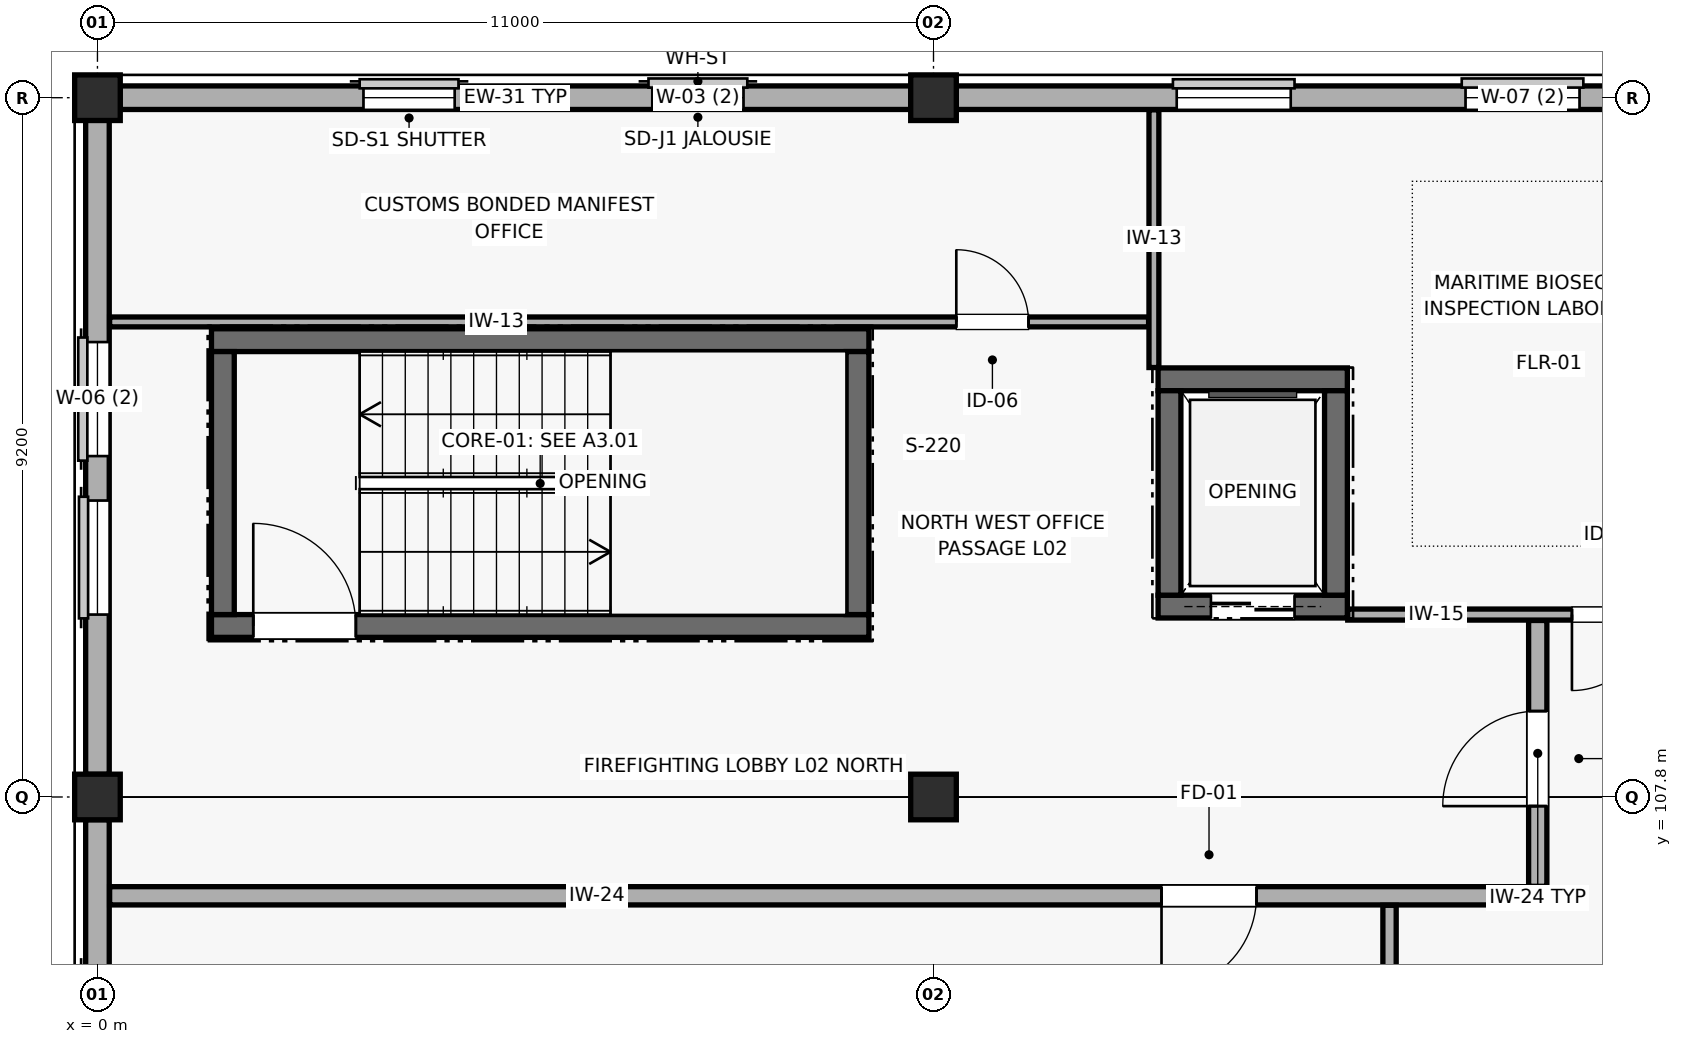
"""IFC4 building model, lengths in metres.
Left out: names, types, materials, properties, quantities, classifications, styles, units other than length and angle.
Written with IfcOpenShell. Run it as: python <this file> out.ifc"""

import sys

from ifc_helpers import new_model, si_unit, direction, frame, frame_2d, origin, origin_2d, place, context, subcontext, project, spatial, rectangle, extrude, element, fill, save


model = new_model("IFC4")
c1 = context("Model", 3, precision=1e-05, world=origin(), true_north=direction((0.0, 1.0)))
c2 = subcontext(c1, "Body", "Model", "MODEL_VIEW")
j1 = project(units=[si_unit("LENGTHUNIT", "METRE"), si_unit("PLANEANGLEUNIT", "RADIAN")], contexts=[c1])
p1 = place(None, origin())
s1 = spatial("IfcSite", under=j1, at=p1, CompositionType="ELEMENT")
p2 = place(p1, origin())
s2 = spatial("IfcBuilding", under=s1, at=p2, CompositionType="ELEMENT")
p3 = place(p2, frame((0.0, 0.0, 9.9)))
s3 = spatial("IfcBuildingStorey", under=s2, at=p3, CompositionType="ELEMENT", Elevation=9.9)
for number, where, z_axis, x_axis in (
    (1, (0.0, 107.8, 0.0), (0.0, 0.0, 1.0), (1.0, 0.0, 0.0)),
    (2, (0.0, 117.0, 0.0), (0.0, 0.0, 1.0), (1.0, 0.0, 0.0)),
    (3, (11.0, 107.8, 0.0), (0.0, 0.0, 1.0), (1.0, 0.0, 0.0)),
    (4, (11.0, 117.0, 0.0), (0.0, 0.0, 1.0), (1.0, 0.0, 0.0)),
):
    element("IfcColumn", number, at=place(p3, frame(where, z_axis=z_axis, x_axis=x_axis)), inside=s3, PredefinedType="COLUMN", context=c2, shape_type="SweptSolid", body=[
        extrude(rectangle(XDim=0.6, YDim=0.6, at=origin_2d()), origin(), (0.0, 0.0, 1.0), 4.2),
    ])
p4 = place(p3, frame((10.702, 117.0, 0.0), z_axis=(0.0, 0.0, 1.0), x_axis=(-1.0, 0.0, 0.0)))
e5 = element("IfcWall", 5, at=p4, inside=s3, PredefinedType="SOLIDWALL", context=c2, shape_type="SweptSolid", body=[
    extrude(rectangle(XDim=10.404, YDim=0.31, at=frame_2d((5.202, 0.0))), origin(), (0.0, 0.0, 1.0), 3.425),
])
p5 = place(p4, frame((2.202, 0.0, 0.95)))
e6 = element("IfcOpeningElement", 6, at=p5, cuts=e5, PredefinedType="OPENING", context=c2, shape_type="SweptSolid", body=[
    extrude(rectangle(XDim=1.2, YDim=1.8, at=frame_2d((0.6, 0.9))), frame((0.0, 0.165, 0.0), z_axis=(0.0, -1.0, 0.0), x_axis=(1.0, 0.0, 0.0)), (0.0, 0.0, 1.0), 0.33),
])
p6 = place(p4, frame((6.002, 0.0, 0.95)))
e7 = element("IfcOpeningElement", 7, at=p6, cuts=e5, PredefinedType="OPENING", context=c2, shape_type="SweptSolid", body=[
    extrude(rectangle(XDim=1.2, YDim=1.8, at=frame_2d((0.6, 0.9))), frame((0.0, 0.165, 0.0), z_axis=(0.0, -1.0, 0.0), x_axis=(1.0, 0.0, 0.0)), (0.0, 0.0, 1.0), 0.33),
])
p7 = place(p3, frame((21.702, 117.0, 0.0), z_axis=(0.0, 0.0, 1.0), x_axis=(-1.0, 0.0, 0.0)))
e8 = element("IfcWall", 8, at=p7, inside=s3, PredefinedType="SOLIDWALL", context=c2, shape_type="SweptSolid", body=[
    extrude(rectangle(XDim=10.404, YDim=0.31, at=frame_2d((5.202, 0.0))), origin(), (0.0, 0.0, 1.0), 3.425),
])
p8 = place(p7, frame((2.202, 0.0, 0.95)))
e9 = element("IfcOpeningElement", 9, at=p8, cuts=e8, PredefinedType="OPENING", context=c2, shape_type="SweptSolid", body=[
    extrude(rectangle(XDim=1.5, YDim=2.25, at=frame_2d((0.75, 1.125))), frame((0.0, 0.165, 0.0), z_axis=(0.0, -1.0, 0.0), x_axis=(1.0, 0.0, 0.0)), (0.0, 0.0, 1.0), 0.33),
])
p9 = place(p7, frame((6.002, 0.0, 0.95)))
e10 = element("IfcOpeningElement", 10, at=p9, cuts=e8, PredefinedType="OPENING", context=c2, shape_type="SweptSolid", body=[
    extrude(rectangle(XDim=1.5, YDim=2.25, at=frame_2d((0.75, 1.125))), frame((0.0, 0.165, 0.0), z_axis=(0.0, -1.0, 0.0), x_axis=(1.0, 0.0, 0.0)), (0.0, 0.0, 1.0), 0.33),
])
p10 = place(p3, frame((0.0, 107.502, 0.0), z_axis=(0.0, 0.0, 1.0), x_axis=(0.0, -1.0, 0.0)))
e11 = element("IfcWall", 11, at=p10, inside=s3, PredefinedType="SOLIDWALL", context=c2, shape_type="SweptSolid", body=[
    extrude(rectangle(XDim=8.604, YDim=0.31, at=frame_2d((4.302, 0.0))), origin(), (0.0, 0.0, 1.0), 3.525),
])
p11 = place(p10, frame((2.002, 0.0, 0.95)))
e12 = element("IfcOpeningElement", 12, at=p11, cuts=e11, PredefinedType="OPENING", context=c2, shape_type="SweptSolid", body=[
    extrude(rectangle(XDim=1.5, YDim=1.8, at=frame_2d((0.75, 0.9))), frame((0.0, 0.165, 0.0), z_axis=(0.0, -1.0, 0.0), x_axis=(1.0, 0.0, 0.0)), (0.0, 0.0, 1.0), 0.33),
])
p12 = place(p10, frame((5.002, 0.0, 0.95)))
e13 = element("IfcOpeningElement", 13, at=p12, cuts=e11, PredefinedType="OPENING", context=c2, shape_type="SweptSolid", body=[
    extrude(rectangle(XDim=1.5, YDim=1.8, at=frame_2d((0.75, 0.9))), frame((0.0, 0.165, 0.0), z_axis=(0.0, -1.0, 0.0), x_axis=(1.0, 0.0, 0.0)), (0.0, 0.0, 1.0), 0.33),
])
p13 = place(p3, frame((0.0, 116.702, 0.0), z_axis=(0.0, 0.0, 1.0), x_axis=(0.0, -1.0, 0.0)))
e14 = element("IfcWall", 14, at=p13, inside=s3, PredefinedType="SOLIDWALL", context=c2, shape_type="SweptSolid", body=[
    extrude(rectangle(XDim=8.604, YDim=0.31, at=frame_2d((4.302, 0.0))), origin(), (0.0, 0.0, 1.0), 3.525),
])
p14 = place(p13, frame((2.917, 0.0, 0.95)))
e15 = element("IfcOpeningElement", 15, at=p14, cuts=e14, PredefinedType="OPENING", context=c2, shape_type="SweptSolid", body=[
    extrude(rectangle(XDim=1.5, YDim=1.8, at=frame_2d((0.75, 0.9))), frame((0.0, 0.165, 0.0), z_axis=(0.0, -1.0, 0.0), x_axis=(1.0, 0.0, 0.0)), (0.0, 0.0, 1.0), 0.33),
])
p15 = place(p13, frame((5.002, 0.0, 0.95)))
e16 = element("IfcOpeningElement", 16, at=p15, cuts=e14, PredefinedType="OPENING", context=c2, shape_type="SweptSolid", body=[
    extrude(rectangle(XDim=1.5, YDim=1.8, at=frame_2d((0.75, 0.9))), frame((0.0, 0.165, 0.0), z_axis=(0.0, -1.0, 0.0), x_axis=(1.0, 0.0, 0.0)), (0.0, 0.0, 1.0), 0.33),
])
p16 = place(p3, frame((1.5, 110.05, 0.0), z_axis=(0.0, 0.0, 1.0), x_axis=(1.0, 0.0, 0.0)))
e17 = element("IfcWall", 17, at=p16, inside=s3, PredefinedType="SHEAR", context=c2, shape_type="SweptSolid", body=[
    extrude(rectangle(XDim=8.65, YDim=0.3, at=frame_2d((4.325, 0.0))), origin(), (0.0, 0.0, 1.0), 3.98),
])
p17 = place(p16, frame((0.55, 0.0, 0.0)))
e18 = element("IfcOpeningElement", 18, at=p17, cuts=e17, PredefinedType="OPENING", context=c2, shape_type="SweptSolid", body=[
    extrude(rectangle(XDim=1.35, YDim=2.2, at=frame_2d((0.675, 1.1))), frame((0.0, 0.16, 0.0), z_axis=(0.0, -1.0, 0.0), x_axis=(1.0, 0.0, 0.0)), (0.0, 0.0, 1.0), 0.32),
])
p18 = place(p3, frame((10.15, 113.81, 0.0), z_axis=(0.0, 0.0, 1.0), x_axis=(-1.0, 0.0, 0.0)))
e19 = element("IfcWall", 19, at=p18, inside=s3, PredefinedType="SHEAR", context=c2, shape_type="SweptSolid", body=[
    extrude(rectangle(XDim=8.65, YDim=0.3, at=frame_2d((4.325, 0.0))), origin(), (0.0, 0.0, 1.0), 3.98),
])
for number, where, z_axis, x_axis in (
    (20, (1.65, 113.66, 0.0), (0.0, 0.0, 1.0), (0.0, -1.0, 0.0)),
    (21, (10.0, 110.2, 0.0), (0.0, 0.0, 1.0), (0.0, 1.0, 0.0)),
):
    element("IfcWall", number, at=place(p3, frame(where, z_axis=z_axis, x_axis=x_axis)), inside=s3, PredefinedType="SHEAR", context=c2, shape_type="SweptSolid", body=[
        extrude(rectangle(XDim=3.46, YDim=0.3, at=frame_2d((1.73, 0.0))), origin(), (0.0, 0.0, 1.0), 3.98),
    ])
p19 = place(p3, frame((13.955, 110.305, 0.0), z_axis=(0.0, 0.0, 1.0), x_axis=(1.0, 0.0, 0.0)))
e22 = element("IfcWall", 22, at=p19, inside=s3, PredefinedType="SHEAR", context=c2, shape_type="SweptSolid", body=[
    extrude(rectangle(XDim=2.49, YDim=0.3, at=frame_2d((1.245, 0.0))), origin(), (0.0, 0.0, 1.0), 3.98),
])
p20 = place(p19, frame((0.695, 0.0, 0.0)))
e23 = element("IfcOpeningElement", 23, at=p20, cuts=e22, PredefinedType="OPENING", context=c2, shape_type="SweptSolid", body=[
    extrude(rectangle(XDim=1.1, YDim=2.15, at=frame_2d((0.55, 1.075))), frame((0.0, 0.16, 0.0), z_axis=(0.0, -1.0, 0.0), x_axis=(1.0, 0.0, 0.0)), (0.0, 0.0, 1.0), 0.32),
])
p21 = place(p3, frame((16.445, 113.295, 0.0), z_axis=(0.0, 0.0, 1.0), x_axis=(-1.0, 0.0, 0.0)))
e24 = element("IfcWall", 24, at=p21, inside=s3, PredefinedType="SHEAR", context=c2, shape_type="SweptSolid", body=[
    extrude(rectangle(XDim=2.49, YDim=0.3, at=frame_2d((1.245, 0.0))), origin(), (0.0, 0.0, 1.0), 3.98),
])
for number, where, z_axis, x_axis in (
    (25, (14.105, 113.145, 0.0), (0.0, 0.0, 1.0), (0.0, -1.0, 0.0)),
    (26, (16.295, 110.455, 0.0), (0.0, 0.0, 1.0), (0.0, 1.0, 0.0)),
):
    element("IfcWall", number, at=place(p3, frame(where, z_axis=z_axis, x_axis=x_axis)), inside=s3, PredefinedType="SHEAR", context=c2, shape_type="SweptSolid", body=[
        extrude(rectangle(XDim=2.69, YDim=0.3, at=frame_2d((1.345, 0.0))), origin(), (0.0, 0.0, 1.0), 3.98),
    ])
p22 = place(p3, frame((0.16, 106.5, 0.0), z_axis=(0.0, 0.0, 1.0), x_axis=(1.0, 0.0, 0.0)))
e27 = element("IfcWall", 27, at=p22, inside=s3, PredefinedType="PARTITIONING", context=c2, shape_type="SweptSolid", body=[
    extrude(rectangle(XDim=18.665, YDim=0.24, at=frame_2d((9.333, 0.0))), origin(), (0.0, 0.0, 1.0), 3.525),
])
p23 = place(p22, frame((13.84, 0.0, 0.0)))
e28 = element("IfcOpeningElement", 28, at=p23, cuts=e27, PredefinedType="OPENING", context=c2, shape_type="SweptSolid", body=[
    extrude(rectangle(XDim=1.25, YDim=2.2, at=frame_2d((0.625, 1.1))), frame((0.0, 0.13, 0.0), z_axis=(0.0, -1.0, 0.0), x_axis=(1.0, 0.0, 0.0)), (0.0, 0.0, 1.0), 0.26),
])
p24 = place(p3, frame((17.0, 80.625, 0.0), z_axis=(0.0, 0.0, 1.0), x_axis=(0.0, 1.0, 0.0)))
e29 = element("IfcWall", 29, at=p24, inside=s3, PredefinedType="PARTITIONING", context=c2, shape_type="SweptSolid", body=[
    extrude(rectangle(XDim=25.75, YDim=0.175, at=frame_2d((12.875, 0.0))), origin(), (0.0, 0.0, 1.0), 3.425),
])
p25 = place(p24, frame((8.505, 0.0, 0.0)))
e30 = element("IfcOpeningElement", 30, at=p25, cuts=e29, PredefinedType="OPENING", context=c2, shape_type="SweptSolid", body=[
    extrude(rectangle(XDim=1.95, YDim=2.45, at=frame_2d((0.975, 1.225))), frame((0.0, 0.097, 0.0), z_axis=(0.0, -1.0, 0.0), x_axis=(1.0, 0.0, 0.0)), (0.0, 0.0, 1.0), 0.195),
])
p26 = place(p3, frame((18.95, 106.625, 0.0), z_axis=(0.0, 0.0, 1.0), x_axis=(0.0, 1.0, 0.0)))
e31 = element("IfcWall", 31, at=p26, inside=s3, PredefinedType="PARTITIONING", context=c2, shape_type="SweptSolid", body=[
    extrude(rectangle(XDim=3.498, YDim=0.24, at=frame_2d((1.749, 0.0))), origin(), (0.0, 0.0, 1.0), 3.425),
])
p27 = place(p26, frame((1.055, 0.0, 0.0)))
e32 = element("IfcOpeningElement", 32, at=p27, cuts=e31, PredefinedType="OPENING", context=c2, shape_type="SweptSolid", body=[
    extrude(rectangle(XDim=1.25, YDim=2.2, at=frame_2d((0.625, 1.1))), frame((0.0, 0.13, 0.0), z_axis=(0.0, -1.0, 0.0), x_axis=(1.0, 0.0, 0.0)), (0.0, 0.0, 1.0), 0.26),
])
p28 = place(p3, frame((0.16, 114.05, 0.0), z_axis=(0.0, 0.0, 1.0), x_axis=(1.0, 0.0, 0.0)))
e33 = element("IfcWall", 33, at=p28, inside=s3, PredefinedType="PARTITIONING", context=c2, shape_type="SweptSolid", body=[
    extrude(rectangle(XDim=13.67, YDim=0.13, at=frame_2d((6.835, 0.0))), origin(), (0.0, 0.0, 1.0), 3.525),
])
p29 = place(p28, frame((11.14, 0.0, 0.0)))
e34 = element("IfcOpeningElement", 34, at=p29, cuts=e33, PredefinedType="OPENING", context=c2, shape_type="SweptSolid", body=[
    extrude(rectangle(XDim=0.95, YDim=2.15, at=frame_2d((0.475, 1.075))), frame((0.0, 0.075, 0.0), z_axis=(0.0, -1.0, 0.0), x_axis=(1.0, 0.0, 0.0)), (0.0, 0.0, 1.0), 0.15),
])
p30 = place(p3, frame((13.9, 113.45, 0.0), z_axis=(0.0, 0.0, 1.0), x_axis=(0.0, 1.0, 0.0)))
e35 = element("IfcWall", 35, at=p30, inside=s3, PredefinedType="PARTITIONING", context=c2, shape_type="SweptSolid", body=[
    extrude(rectangle(XDim=3.39, YDim=0.13, at=frame_2d((1.695, 0.0))), origin(), (0.0, 0.0, 1.0), 3.425),
])
p31 = place(p3, frame((16.45, 110.2, 0.0), z_axis=(0.0, 0.0, 1.0), x_axis=(1.0, 0.0, 0.0)))
e36 = element("IfcWall", 36, at=p31, inside=s3, PredefinedType="PARTITIONING", context=c2, shape_type="SweptSolid", body=[
    extrude(rectangle(XDim=5.39, YDim=0.145, at=frame_2d((2.695, 0.0))), origin(), (0.0, 0.0, 1.0), 3.98),
])
p32 = place(p31, frame((2.95, 0.0, 0.0)))
e37 = element("IfcOpeningElement", 37, at=p32, cuts=e36, PredefinedType="OPENING", context=c2, shape_type="SweptSolid", body=[
    extrude(rectangle(XDim=1.0, YDim=2.15, at=frame_2d((0.5, 1.075))), frame((0.0, 0.083, 0.0), z_axis=(0.0, -1.0, 0.0), x_axis=(1.0, 0.0, 0.0)), (0.0, 0.0, 1.0), 0.165),
])
p33 = place(p5, origin())
e38 = element("IfcWindow", 38, at=p33, inside=s3, PartitioningType="SINGLE_PANEL", PredefinedType="WINDOW", context=c2, shape_type="SweptSolid", body=[
    extrude(rectangle(XDim=1.2, YDim=1.8, at=frame_2d((0.6, 0.9))), frame((0.0, 0.03, 0.0), z_axis=(0.0, -1.0, 0.0), x_axis=(1.0, 0.0, 0.0)), (0.0, 0.0, 1.0), 0.06),
])
fill(e6, e38)
p34 = place(p6, origin())
e39 = element("IfcWindow", 39, at=p34, inside=s3, PartitioningType="SINGLE_PANEL", PredefinedType="WINDOW", context=c2, shape_type="SweptSolid", body=[
    extrude(rectangle(XDim=1.2, YDim=1.8, at=frame_2d((0.6, 0.9))), frame((0.0, 0.03, 0.0), z_axis=(0.0, -1.0, 0.0), x_axis=(1.0, 0.0, 0.0)), (0.0, 0.0, 1.0), 0.06),
])
fill(e7, e39)
p35 = place(p8, origin())
e40 = element("IfcWindow", 40, at=p35, inside=s3, PartitioningType="SINGLE_PANEL", PredefinedType="WINDOW", context=c2, shape_type="SweptSolid", body=[
    extrude(rectangle(XDim=1.5, YDim=2.25, at=frame_2d((0.75, 1.125))), frame((0.0, 0.03, 0.0), z_axis=(0.0, -1.0, 0.0), x_axis=(1.0, 0.0, 0.0)), (0.0, 0.0, 1.0), 0.06),
])
fill(e9, e40)
p36 = place(p9, origin())
e41 = element("IfcWindow", 41, at=p36, inside=s3, PartitioningType="SINGLE_PANEL", PredefinedType="WINDOW", context=c2, shape_type="SweptSolid", body=[
    extrude(rectangle(XDim=1.5, YDim=2.25, at=frame_2d((0.75, 1.125))), frame((0.0, 0.03, 0.0), z_axis=(0.0, -1.0, 0.0), x_axis=(1.0, 0.0, 0.0)), (0.0, 0.0, 1.0), 0.06),
])
fill(e10, e41)
p37 = place(p14, origin())
e42 = element("IfcWindow", 42, at=p37, inside=s3, PartitioningType="SINGLE_PANEL", PredefinedType="WINDOW", context=c2, shape_type="SweptSolid", body=[
    extrude(rectangle(XDim=1.5, YDim=1.8, at=frame_2d((0.75, 0.9))), frame((0.0, 0.03, 0.0), z_axis=(0.0, -1.0, 0.0), x_axis=(1.0, 0.0, 0.0)), (0.0, 0.0, 1.0), 0.06),
])
fill(e15, e42)
p38 = place(p15, origin())
e43 = element("IfcWindow", 43, at=p38, inside=s3, PartitioningType="SINGLE_PANEL", PredefinedType="WINDOW", context=c2, shape_type="SweptSolid", body=[
    extrude(rectangle(XDim=1.5, YDim=1.8, at=frame_2d((0.75, 0.9))), frame((0.0, 0.03, 0.0), z_axis=(0.0, -1.0, 0.0), x_axis=(1.0, 0.0, 0.0)), (0.0, 0.0, 1.0), 0.06),
])
fill(e16, e43)
p39 = place(p17, origin())
e44 = element("IfcDoor", 44, at=p39, inside=s3, OperationType="SINGLE_SWING_LEFT", PredefinedType="DOOR", context=c2, shape_type="SweptSolid", body=[
    extrude(rectangle(XDim=1.35, YDim=2.2, at=frame_2d((0.675, 1.1))), frame((0.0, 0.025, 0.0), z_axis=(0.0, -1.0, 0.0), x_axis=(1.0, 0.0, 0.0)), (0.0, 0.0, 1.0), 0.05),
])
fill(e18, e44)
p40 = place(p20, frame((1.1, 0.0, 0.0), z_axis=(0.0, 0.0, 1.0), x_axis=(-1.0, 0.0, 0.0)))
e45 = element("IfcDoor", 45, at=p40, inside=s3, OperationType="DOUBLE_DOOR_SLIDING", PredefinedType="DOOR", context=c2, shape_type="SweptSolid", body=[
    extrude(rectangle(XDim=1.1, YDim=2.15, at=frame_2d((0.55, 1.075))), frame((0.0, 0.025, 0.0), z_axis=(0.0, -1.0, 0.0), x_axis=(1.0, 0.0, 0.0)), (0.0, 0.0, 1.0), 0.05),
])
fill(e23, e45)
p41 = place(p23, frame((1.25, 0.0, 0.0), z_axis=(0.0, 0.0, 1.0), x_axis=(-1.0, 0.0, 0.0)))
e46 = element("IfcDoor", 46, at=p41, inside=s3, OperationType="SINGLE_SWING_RIGHT", PredefinedType="DOOR", context=c2, shape_type="SweptSolid", body=[
    extrude(rectangle(XDim=1.25, YDim=2.2, at=frame_2d((0.625, 1.1))), frame((0.0, 0.025, 0.0), z_axis=(0.0, -1.0, 0.0), x_axis=(1.0, 0.0, 0.0)), (0.0, 0.0, 1.0), 0.05),
])
fill(e28, e46)
p42 = place(p27, origin())
e47 = element("IfcDoor", 47, at=p42, inside=s3, OperationType="SINGLE_SWING_LEFT", PredefinedType="DOOR", context=c2, shape_type="SweptSolid", body=[
    extrude(rectangle(XDim=1.25, YDim=2.2, at=frame_2d((0.625, 1.1))), frame((0.0, 0.025, 0.0), z_axis=(0.0, -1.0, 0.0), x_axis=(1.0, 0.0, 0.0)), (0.0, 0.0, 1.0), 0.05),
])
fill(e32, e47)
p43 = place(p29, origin())
e48 = element("IfcDoor", 48, at=p43, inside=s3, OperationType="SINGLE_SWING_LEFT", PredefinedType="DOOR", context=c2, shape_type="SweptSolid", body=[
    extrude(rectangle(XDim=0.95, YDim=2.15, at=frame_2d((0.475, 1.075))), frame((0.0, 0.025, 0.0), z_axis=(0.0, -1.0, 0.0), x_axis=(1.0, 0.0, 0.0)), (0.0, 0.0, 1.0), 0.05),
])
fill(e34, e48)
p44 = place(p32, frame((1.0, 0.0, 0.0), z_axis=(0.0, 0.0, 1.0), x_axis=(-1.0, 0.0, 0.0)))
e49 = element("IfcDoor", 49, at=p44, inside=s3, OperationType="SINGLE_SWING_RIGHT", PredefinedType="DOOR", context=c2, shape_type="SweptSolid", body=[
    extrude(rectangle(XDim=1.0, YDim=2.15, at=frame_2d((0.5, 1.075))), frame((0.0, 0.025, 0.0), z_axis=(0.0, -1.0, 0.0), x_axis=(1.0, 0.0, 0.0)), (0.0, 0.0, 1.0), 0.05),
])
fill(e37, e49)
save(model, sys.argv[1])
